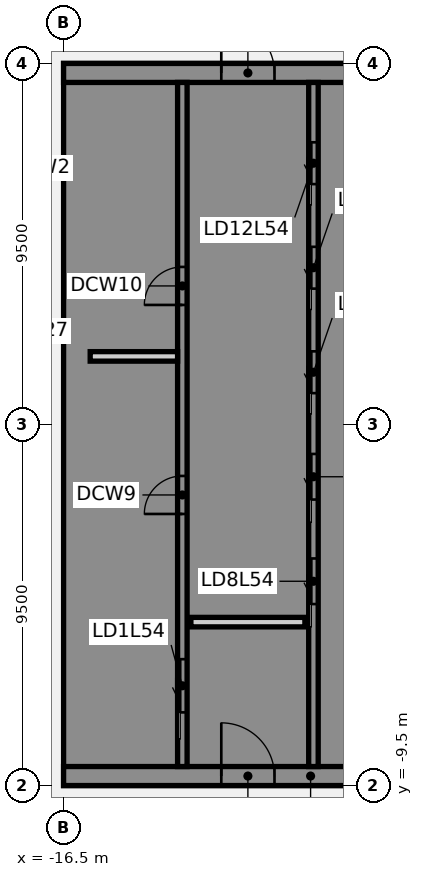
"""IFC4 building model, lengths in metres.
Left out: names, types, materials, properties, quantities, classifications, styles, units other than length and angle.
Written with IfcOpenShell. Run it as: python <this file> out.ifc"""

import sys

from ifc_helpers import new_model, si_unit, direction, frame, frame_2d, origin, place, context, subcontext, project, spatial, polyline, rectangle, outline, extrude, element, fill, save


model = new_model("IFC4")
c1 = context("Model", 3, precision=1e-05, world=origin(), true_north=direction((0.0, 1.0)))
c2 = subcontext(c1, "Body", "Model", "MODEL_VIEW")
j1 = project(units=[si_unit("LENGTHUNIT", "METRE"), si_unit("PLANEANGLEUNIT", "RADIAN")], contexts=[c1])
p1 = place(None, origin())
s1 = spatial("IfcSite", under=j1, at=p1, CompositionType="ELEMENT")
p2 = place(p1, origin())
s2 = spatial("IfcBuilding", under=s1, at=p2, CompositionType="ELEMENT")
p3 = place(p2, frame((0.0, 0.0, 214.9)))
s3 = spatial("IfcBuildingStorey", under=s2, at=p3, CompositionType="ELEMENT", Elevation=214.9)
p4 = place(p3, frame((-16.5, -9.25, 0.0), z_axis=(0.0, 0.0, 1.0), x_axis=(1.0, 0.0, 0.0)))
e1 = element("IfcWall", 1, at=p4, inside=s3, PredefinedType="SHEAR", context=c2, shape_type="SweptSolid", body=[
    extrude(rectangle(XDim=13.0, YDim=0.5, at=frame_2d((6.5, 0.0))), origin(), (0.0, 0.0, 1.0), 4.86),
])
p5 = place(p4, frame((4.15, 0.0, 0.0)))
e2 = element("IfcOpeningElement", 2, at=p5, cuts=e1, PredefinedType="OPENING", context=c2, shape_type="SweptSolid", body=[
    extrude(rectangle(XDim=1.4, YDim=2.1, at=frame_2d((0.7, 1.05))), frame((0.0, 0.26, 0.0), z_axis=(0.0, -1.0, 0.0), x_axis=(1.0, 0.0, 0.0)), (0.0, 0.0, 1.0), 0.52),
])
p6 = place(p4, frame((10.125, 0.0, 0.0)))
e3 = element("IfcOpeningElement", 3, at=p6, cuts=e1, PredefinedType="OPENING", context=c2, shape_type="SweptSolid", body=[
    extrude(rectangle(XDim=1.4, YDim=2.1, at=frame_2d((0.7, 1.05))), frame((0.0, 0.26, 0.0), z_axis=(0.0, -1.0, 0.0), x_axis=(1.0, 0.0, 0.0)), (0.0, 0.0, 1.0), 0.52),
])
p7 = place(p3, origin())
e4 = element("IfcWall", 4, at=p7, inside=s3, PredefinedType="SHEAR", context=c2, shape_type="SweptSolid", body=[
    extrude(outline(polyline([(-13.5, -8.125), (-16.0, -8.125), (-16.0, -5.625), (-13.5, -5.625), (-13.5, -5.375), (-16.0, -5.375), (-16.0, 5.375), (-13.5, 5.375), (-13.5, 5.625), (-16.0, 5.625), (-16.0, 8.125), (-13.5, 8.125), (-13.5, 9.0), (-16.0, 9.0), (-16.5, 9.0), (-16.5, -9.0), (-16.0, -9.0), (-13.5, -9.0), (-13.5, -8.125)])), origin(), (0.0, 0.0, 1.0), 4.86),
])
p8 = place(p3, frame((-16.5, 9.25, 0.0), z_axis=(0.0, 0.0, 1.0), x_axis=(1.0, 0.0, 0.0)))
e5 = element("IfcWall", 5, at=p8, inside=s3, PredefinedType="SHEAR", context=c2, shape_type="SweptSolid", body=[
    extrude(rectangle(XDim=13.0, YDim=0.5, at=frame_2d((6.5, 0.0))), origin(), (0.0, 0.0, 1.0), 4.86),
])
p9 = place(p8, frame((4.15, 0.0, 0.0)))
e6 = element("IfcOpeningElement", 6, at=p9, cuts=e5, PredefinedType="OPENING", context=c2, shape_type="SweptSolid", body=[
    extrude(rectangle(XDim=1.4, YDim=2.1, at=frame_2d((0.7, 1.05))), frame((0.0, 0.26, 0.0), z_axis=(0.0, -1.0, 0.0), x_axis=(1.0, 0.0, 0.0)), (0.0, 0.0, 1.0), 0.52),
])
p10 = place(p3, origin())
e7 = element("IfcWall", 7, at=p10, inside=s3, PredefinedType="SHEAR", context=c2, shape_type="SweptSolid", body=[
    extrude(outline(polyline([(-9.8, -5.375), (-9.8, -5.625), (-7.5, -5.625), (-7.25, -5.625), (-7.25, 9.0), (-7.5, 9.0), (-9.8, 9.0), (-9.8, 8.125), (-7.5, 8.125), (-7.5, 5.625), (-9.8, 5.625), (-9.8, 5.375), (-7.5, 5.375), (-7.5, 2.875), (-9.8, 2.875), (-9.8, 2.625), (-7.5, 2.625), (-7.5, 0.125), (-9.8, 0.125), (-9.8, -0.125), (-7.5, -0.125), (-7.5, -2.625), (-9.8, -2.625), (-9.8, -2.875), (-7.5, -2.875), (-7.5, -5.375), (-9.8, -5.375)])), origin(), (0.0, 0.0, 1.0), 4.86),
])
p11 = place(p3, origin())
e8 = element("IfcWall", 8, at=p11, inside=s3, PredefinedType="SHEAR", context=c2, shape_type="SweptSolid", body=[
    extrude(outline(polyline([(-7.5, -8.125), (-9.55, -8.125), (-9.55, -5.625), (-9.8, -5.625), (-9.8, -8.125), (-9.8, -9.0), (-7.5, -9.0), (-7.5, -8.125)])), origin(), (0.0, 0.0, 1.0), 4.86),
])
p12 = place(p3, frame((-13.375, -9.0, 0.0), z_axis=(0.0, 0.0, 1.0), x_axis=(0.0, 1.0, 0.0)))
e9 = element("IfcWall", 9, at=p12, inside=s3, PredefinedType="SHEAR", context=c2, shape_type="SweptSolid", body=[
    extrude(rectangle(XDim=18.0, YDim=0.25, at=frame_2d((9.0, 0.0))), origin(), (0.0, 0.0, 1.0), 4.86),
])
p13 = place(p12, frame((1.425, 0.0, 0.0)))
e10 = element("IfcOpeningElement", 10, at=p13, cuts=e9, PredefinedType="OPENING", context=c2, shape_type="SweptSolid", body=[
    extrude(rectangle(XDim=1.4, YDim=2.1, at=frame_2d((0.7, 1.05))), frame((0.0, 0.135, 0.0), z_axis=(0.0, -1.0, 0.0), x_axis=(1.0, 0.0, 0.0)), (0.0, 0.0, 1.0), 0.27),
])
p14 = place(p12, frame((6.646, 0.0, 0.0)))
e11 = element("IfcOpeningElement", 11, at=p14, cuts=e9, PredefinedType="OPENING", context=c2, shape_type="SweptSolid", body=[
    extrude(rectangle(XDim=1.0, YDim=2.1, at=frame_2d((0.5, 1.05))), frame((0.0, 0.135, 0.0), z_axis=(0.0, -1.0, 0.0), x_axis=(1.0, 0.0, 0.0)), (0.0, 0.0, 1.0), 0.27),
])
p15 = place(p12, frame((12.146, 0.0, 0.0)))
e12 = element("IfcOpeningElement", 12, at=p15, cuts=e9, PredefinedType="OPENING", context=c2, shape_type="SweptSolid", body=[
    extrude(rectangle(XDim=1.0, YDim=2.1, at=frame_2d((0.5, 1.05))), frame((0.0, 0.135, 0.0), z_axis=(0.0, -1.0, 0.0), x_axis=(1.0, 0.0, 0.0)), (0.0, 0.0, 1.0), 0.27),
])
p16 = place(p3, frame((-9.925, -9.0, 0.0), z_axis=(0.0, 0.0, 1.0), x_axis=(0.0, 1.0, 0.0)))
e13 = element("IfcWall", 13, at=p16, inside=s3, PredefinedType="SHEAR", context=c2, shape_type="SweptSolid", body=[
    extrude(rectangle(XDim=18.0, YDim=0.25, at=frame_2d((9.0, 0.0))), origin(), (0.0, 0.0, 1.0), 4.86),
])
p17 = place(p16, frame((4.275, 0.0, 0.0)))
e14 = element("IfcOpeningElement", 14, at=p17, cuts=e13, PredefinedType="OPENING", context=c2, shape_type="SweptSolid", body=[
    extrude(rectangle(XDim=1.2, YDim=2.1, at=frame_2d((0.6, 1.05))), frame((0.0, 0.135, 0.0), z_axis=(0.0, -1.0, 0.0), x_axis=(1.0, 0.0, 0.0)), (0.0, 0.0, 1.0), 0.27),
])
p18 = place(p16, frame((7.025, 0.0, 0.0)))
e15 = element("IfcOpeningElement", 15, at=p18, cuts=e13, PredefinedType="OPENING", context=c2, shape_type="SweptSolid", body=[
    extrude(rectangle(XDim=1.2, YDim=2.1, at=frame_2d((0.6, 1.05))), frame((0.0, 0.135, 0.0), z_axis=(0.0, -1.0, 0.0), x_axis=(1.0, 0.0, 0.0)), (0.0, 0.0, 1.0), 0.27),
])
p19 = place(p16, frame((9.825, 0.0, 0.0)))
e16 = element("IfcOpeningElement", 16, at=p19, cuts=e13, PredefinedType="OPENING", context=c2, shape_type="SweptSolid", body=[
    extrude(rectangle(XDim=1.1, YDim=2.1, at=frame_2d((0.55, 1.05))), frame((0.0, 0.135, 0.0), z_axis=(0.0, -1.0, 0.0), x_axis=(1.0, 0.0, 0.0)), (0.0, 0.0, 1.0), 0.27),
])
p20 = place(p16, frame((12.575, 0.0, 0.0)))
e17 = element("IfcOpeningElement", 17, at=p20, cuts=e13, PredefinedType="OPENING", context=c2, shape_type="SweptSolid", body=[
    extrude(rectangle(XDim=1.1, YDim=2.1, at=frame_2d((0.55, 1.05))), frame((0.0, 0.135, 0.0), z_axis=(0.0, -1.0, 0.0), x_axis=(1.0, 0.0, 0.0)), (0.0, 0.0, 1.0), 0.27),
])
p21 = place(p16, frame((15.325, 0.0, 0.0)))
e18 = element("IfcOpeningElement", 18, at=p21, cuts=e13, PredefinedType="OPENING", context=c2, shape_type="SweptSolid", body=[
    extrude(rectangle(XDim=1.1, YDim=2.1, at=frame_2d((0.55, 1.05))), frame((0.0, 0.135, 0.0), z_axis=(0.0, -1.0, 0.0), x_axis=(1.0, 0.0, 0.0)), (0.0, 0.0, 1.0), 0.27),
])
p22 = place(p3, frame((-13.15, -5.2, 0.0), z_axis=(0.0, 0.0, 1.0), x_axis=(1.0, 0.0, 0.0)))
e19 = element("IfcWall", 19, at=p22, inside=s3, PredefinedType="PARTITIONING", context=c2, shape_type="SweptSolid", body=[
    extrude(rectangle(XDim=3.0, YDim=0.25, at=frame_2d((1.5, 0.0))), origin(), (0.0, 0.0, 1.0), 4.86),
])
p23 = place(p3, frame((-15.8, 1.792, 0.0), z_axis=(0.0, 0.0, 1.0), x_axis=(1.0, 0.0, 0.0)))
e20 = element("IfcWall", 20, at=p23, inside=s3, PredefinedType="PARTITIONING", context=c2, shape_type="SweptSolid", body=[
    extrude(rectangle(XDim=2.3, YDim=0.25, at=frame_2d((1.15, 0.0))), origin(), (0.0, 0.0, 1.0), 4.86),
])
p24 = place(p5, origin())
e21 = element("IfcDoor", 21, at=p24, inside=s3, OperationType="SINGLE_SWING_LEFT", PredefinedType="DOOR", context=c2, shape_type="SweptSolid", body=[
    extrude(rectangle(XDim=1.4, YDim=2.1, at=frame_2d((0.7, 1.05))), frame((0.0, 0.025, 0.0), z_axis=(0.0, -1.0, 0.0), x_axis=(1.0, 0.0, 0.0)), (0.0, 0.0, 1.0), 0.05),
])
fill(e2, e21)
p25 = place(p13, origin())
e22 = element("IfcDoor", 22, at=p25, inside=s3, OperationType="SLIDING_TO_LEFT", PredefinedType="DOOR", context=c2, shape_type="SweptSolid", body=[
    extrude(rectangle(XDim=1.4, YDim=2.1, at=frame_2d((0.7, 1.05))), frame((0.0, 0.025, 0.0), z_axis=(0.0, -1.0, 0.0), x_axis=(1.0, 0.0, 0.0)), (0.0, 0.0, 1.0), 0.05),
])
fill(e10, e22)
p26 = place(p17, origin())
e23 = element("IfcDoor", 23, at=p26, inside=s3, OperationType="SLIDING_TO_LEFT", PredefinedType="DOOR", context=c2, shape_type="SweptSolid", body=[
    extrude(rectangle(XDim=1.2, YDim=2.1, at=frame_2d((0.6, 1.05))), frame((0.0, 0.025, 0.0), z_axis=(0.0, -1.0, 0.0), x_axis=(1.0, 0.0, 0.0)), (0.0, 0.0, 1.0), 0.05),
])
fill(e14, e23)
p27 = place(p18, origin())
e24 = element("IfcDoor", 24, at=p27, inside=s3, OperationType="SLIDING_TO_LEFT", PredefinedType="DOOR", context=c2, shape_type="SweptSolid", body=[
    extrude(rectangle(XDim=1.2, YDim=2.1, at=frame_2d((0.6, 1.05))), frame((0.0, 0.025, 0.0), z_axis=(0.0, -1.0, 0.0), x_axis=(1.0, 0.0, 0.0)), (0.0, 0.0, 1.0), 0.05),
])
fill(e15, e24)
p28 = place(p19, origin())
e25 = element("IfcDoor", 25, at=p28, inside=s3, OperationType="SLIDING_TO_LEFT", PredefinedType="DOOR", context=c2, shape_type="SweptSolid", body=[
    extrude(rectangle(XDim=1.1, YDim=2.1, at=frame_2d((0.55, 1.05))), frame((0.0, 0.025, 0.0), z_axis=(0.0, -1.0, 0.0), x_axis=(1.0, 0.0, 0.0)), (0.0, 0.0, 1.0), 0.05),
])
fill(e16, e25)
p29 = place(p20, origin())
e26 = element("IfcDoor", 26, at=p29, inside=s3, OperationType="SLIDING_TO_LEFT", PredefinedType="DOOR", context=c2, shape_type="SweptSolid", body=[
    extrude(rectangle(XDim=1.1, YDim=2.1, at=frame_2d((0.55, 1.05))), frame((0.0, 0.025, 0.0), z_axis=(0.0, -1.0, 0.0), x_axis=(1.0, 0.0, 0.0)), (0.0, 0.0, 1.0), 0.05),
])
fill(e17, e26)
p30 = place(p21, origin())
e27 = element("IfcDoor", 27, at=p30, inside=s3, OperationType="SLIDING_TO_LEFT", PredefinedType="DOOR", context=c2, shape_type="SweptSolid", body=[
    extrude(rectangle(XDim=1.1, YDim=2.1, at=frame_2d((0.55, 1.05))), frame((0.0, 0.025, 0.0), z_axis=(0.0, -1.0, 0.0), x_axis=(1.0, 0.0, 0.0)), (0.0, 0.0, 1.0), 0.05),
])
fill(e18, e27)
p31 = place(p9, origin())
e28 = element("IfcDoor", 28, at=p31, inside=s3, OperationType="SINGLE_SWING_LEFT", PredefinedType="DOOR", context=c2, shape_type="SweptSolid", body=[
    extrude(rectangle(XDim=1.4, YDim=2.1, at=frame_2d((0.7, 1.05))), frame((0.0, 0.025, 0.0), z_axis=(0.0, -1.0, 0.0), x_axis=(1.0, 0.0, 0.0)), (0.0, 0.0, 1.0), 0.05),
])
fill(e6, e28)
p32 = place(p14, origin())
e29 = element("IfcDoor", 29, at=p32, inside=s3, OperationType="SINGLE_SWING_LEFT", PredefinedType="DOOR", context=c2, shape_type="SweptSolid", body=[
    extrude(rectangle(XDim=1.0, YDim=2.1, at=frame_2d((0.5, 1.05))), frame((0.0, 0.025, 0.0), z_axis=(0.0, -1.0, 0.0), x_axis=(1.0, 0.0, 0.0)), (0.0, 0.0, 1.0), 0.05),
])
fill(e11, e29)
p33 = place(p15, origin())
e30 = element("IfcDoor", 30, at=p33, inside=s3, OperationType="SINGLE_SWING_LEFT", PredefinedType="DOOR", context=c2, shape_type="SweptSolid", body=[
    extrude(rectangle(XDim=1.0, YDim=2.1, at=frame_2d((0.5, 1.05))), frame((0.0, 0.025, 0.0), z_axis=(0.0, -1.0, 0.0), x_axis=(1.0, 0.0, 0.0)), (0.0, 0.0, 1.0), 0.05),
])
fill(e12, e30)
save(model, sys.argv[1])
